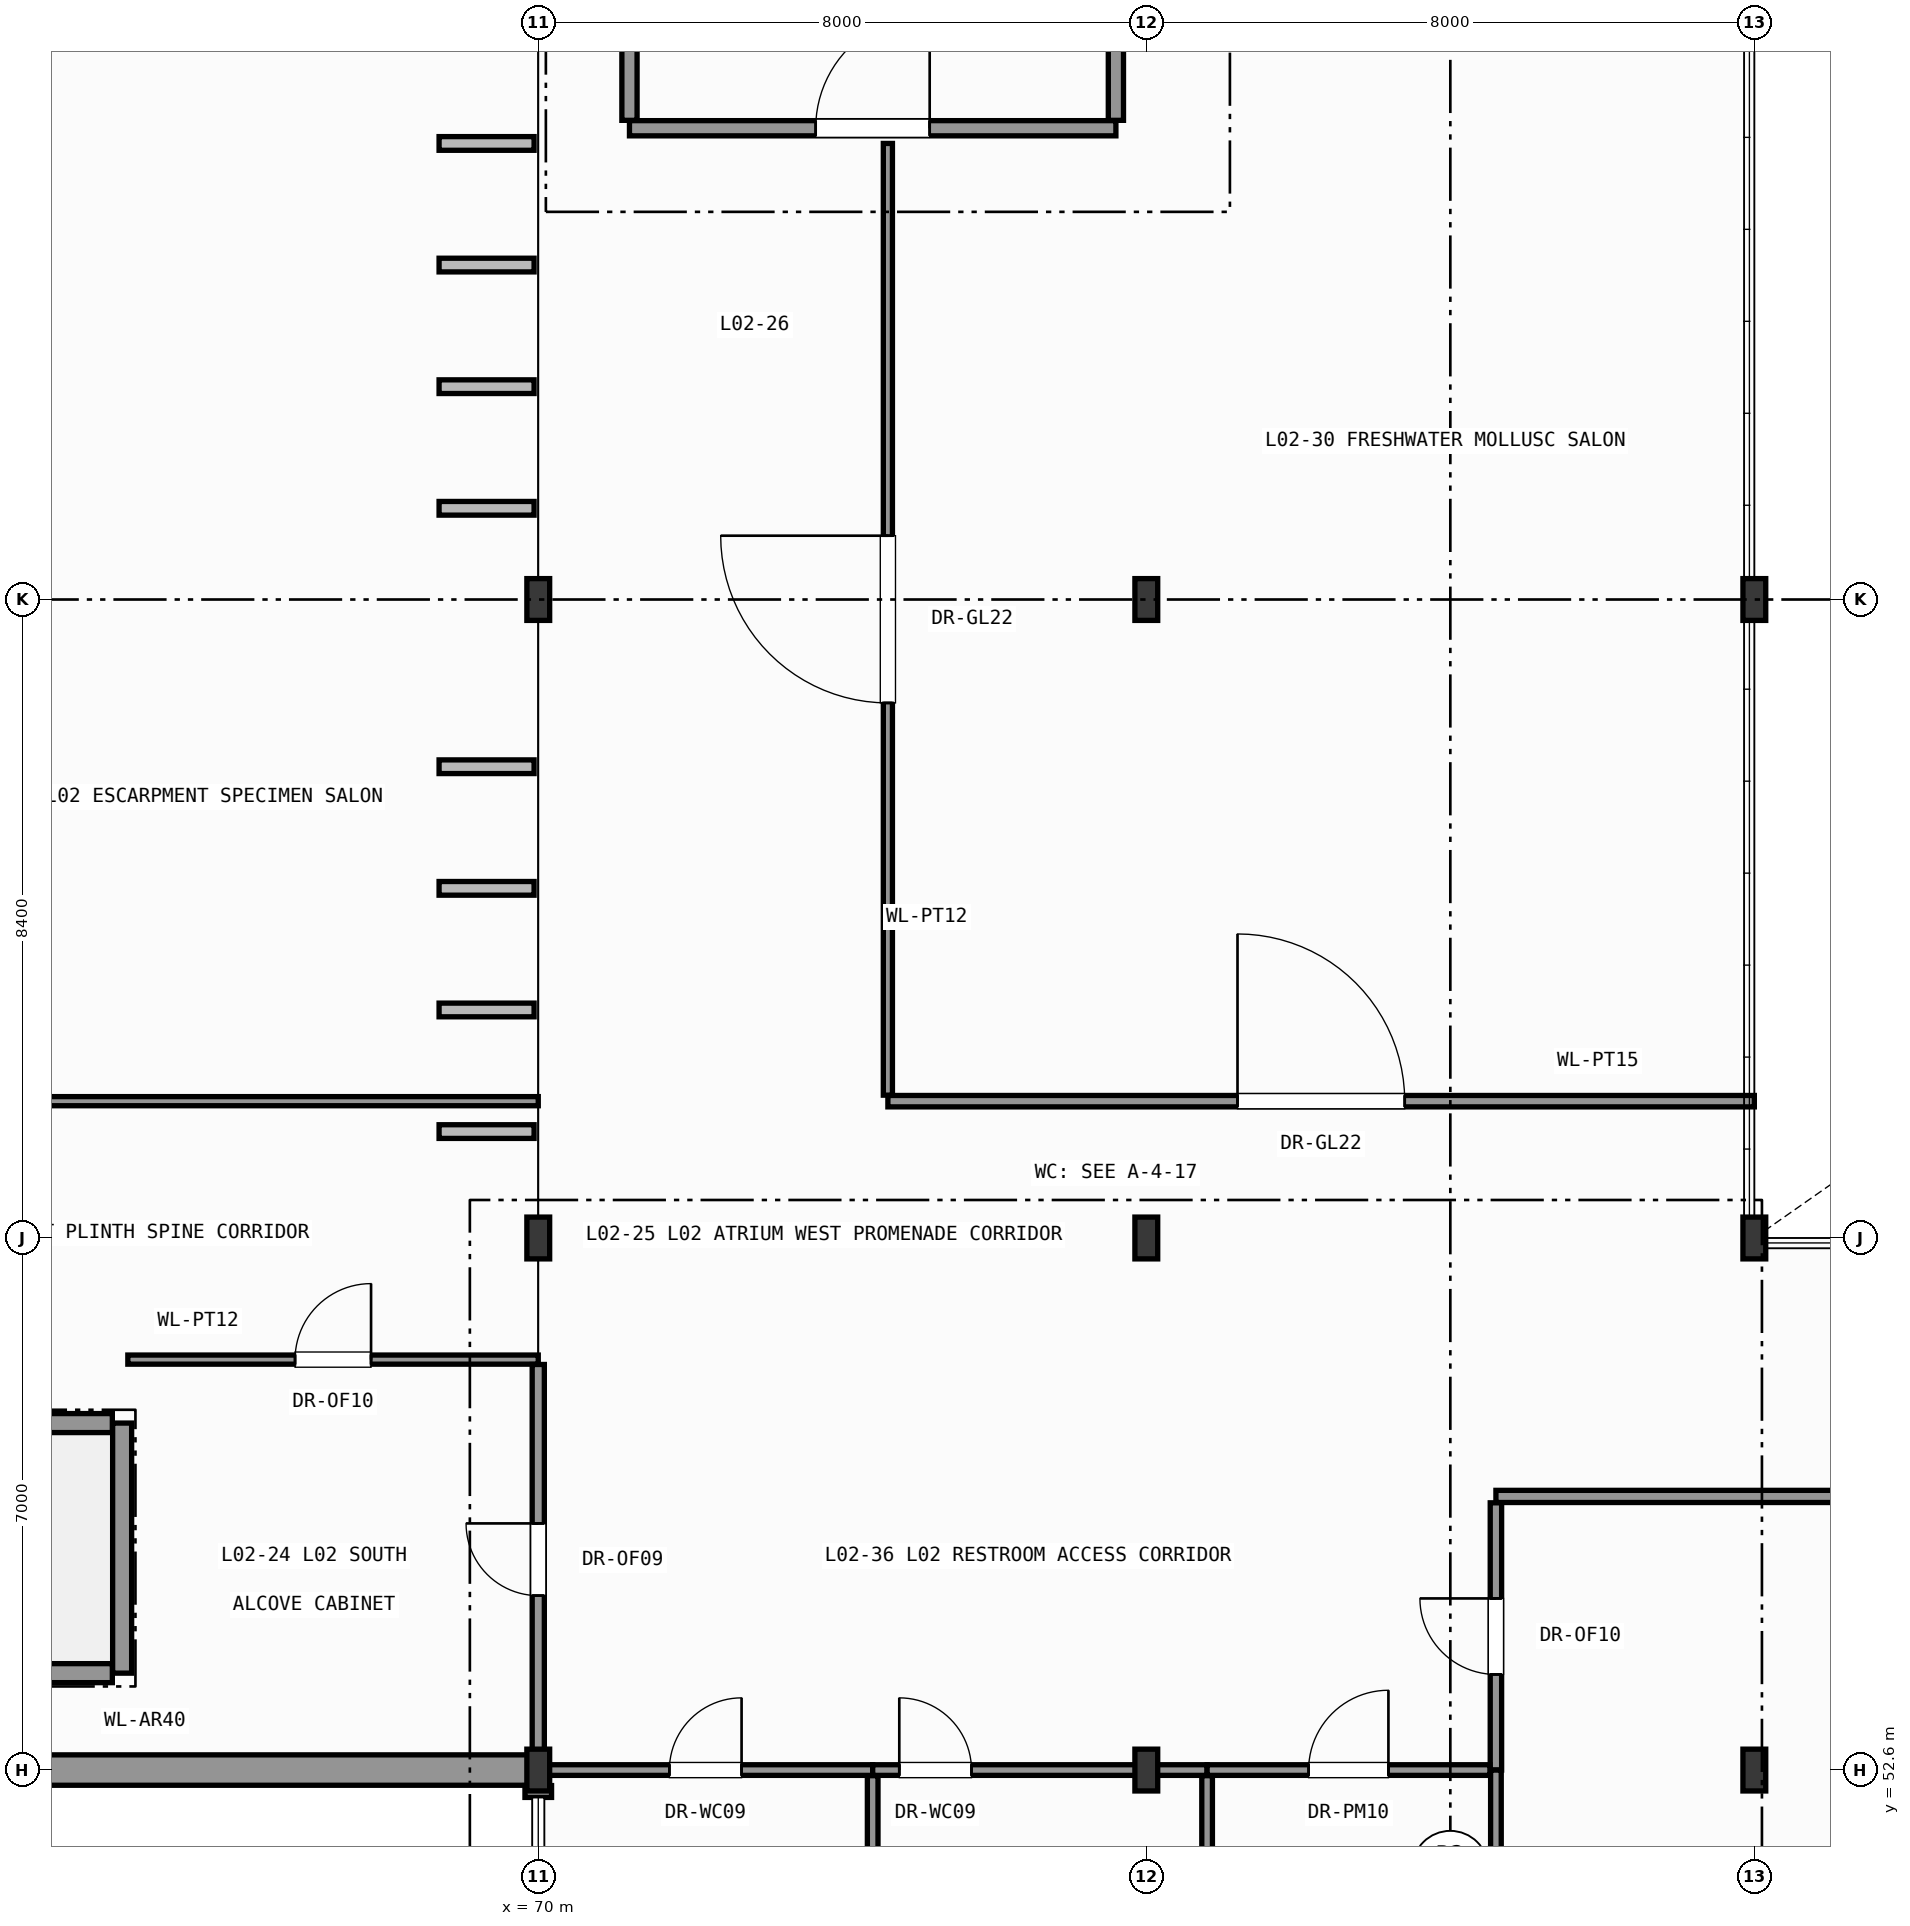
"""IFC4 building model, lengths in metres.
Left out: names, types, materials, properties, quantities, classifications, styles, units other than length and angle.
Written with IfcOpenShell. Run it as: python <this file> out.ifc"""

import sys

from ifc_helpers import new_model, si_unit, direction, frame, frame_2d, origin, origin_2d, place, context, subcontext, project, spatial, rectangle, i_section, extrude, element, fill, save


model = new_model("IFC4")
c1 = context("Model", 3, precision=1e-05, world=origin(), true_north=direction((0.0, 1.0)))
c2 = subcontext(c1, "Body", "Model", "MODEL_VIEW")
j1 = project(units=[si_unit("LENGTHUNIT", "METRE"), si_unit("PLANEANGLEUNIT", "RADIAN")], contexts=[c1])
p1 = place(None, origin())
s1 = spatial("IfcSite", under=j1, at=p1, CompositionType="ELEMENT")
p2 = place(p1, origin())
s2 = spatial("IfcBuilding", under=s1, at=p2, CompositionType="ELEMENT")
p3 = place(p2, frame((0.0, 0.0, 7.8)))
s3 = spatial("IfcBuildingStorey", under=s2, at=p3, CompositionType="ELEMENT", Elevation=7.8)
for number, where, z_axis, x_axis in (
    (1, (70.0, 52.6, 0.0), (0.0, 0.0, 1.0), (1.0, 0.0, 0.0)),
    (2, (70.0, 59.6, 0.0), (0.0, 0.0, 1.0), (1.0, 0.0, 0.0)),
    (3, (70.0, 68.0, 0.0), (0.0, 0.0, 1.0), (1.0, 0.0, 0.0)),
    (4, (78.0, 52.6, 0.0), (0.0, 0.0, 1.0), (1.0, 0.0, 0.0)),
    (5, (78.0, 59.6, 0.0), (0.0, 0.0, 1.0), (1.0, 0.0, 0.0)),
    (6, (78.0, 68.0, 0.0), (0.0, 0.0, 1.0), (1.0, 0.0, 0.0)),
    (7, (86.0, 52.6, 0.0), (0.0, 0.0, 1.0), (1.0, 0.0, 0.0)),
    (8, (86.0, 59.6, 0.0), (0.0, 0.0, 1.0), (1.0, 0.0, 0.0)),
    (9, (86.0, 68.0, 0.0), (0.0, 0.0, 1.0), (1.0, 0.0, 0.0)),
):
    element("IfcColumn", number, at=place(p3, frame(where, z_axis=z_axis, x_axis=x_axis)), inside=s3, PredefinedType="COLUMN", context=c2, shape_type="SweptSolid", body=[
        extrude(i_section(OverallWidth=0.3, OverallDepth=0.55, WebThickness=0.015, FlangeThickness=0.029, FilletRadius=0.027, at=origin_2d()), origin(), (0.0, 0.0, 1.0), 5.4),
    ])
p4 = place(p3, frame((70.0, 52.6, 0.0), z_axis=(0.0, 0.0, 1.0), x_axis=(-1.0, 0.0, 0.0)))
e10 = element("IfcWall", 10, at=p4, inside=s3, PredefinedType="SOLIDWALL", context=c2, shape_type="SweptSolid", body=[
    extrude(rectangle(XDim=14.0, YDim=0.4, at=frame_2d((7.0, 0.0))), origin(), (0.0, 0.0, 1.0), 5.15),
])
p5 = place(p3, frame((70.0, 52.396, 0.0), z_axis=(0.0, 0.0, 1.0), x_axis=(0.0, -1.0, 0.0)))
e11 = element("IfcWall", 11, at=p5, inside=s3, PredefinedType="SOLIDWALL", context=c2, shape_type="SweptSolid", body=[
    extrude(rectangle(XDim=0.156, YDim=0.35, at=frame_2d((0.078, 0.0))), origin(), (0.0, 0.0, 1.0), 5.15),
])
p6 = place(p3, frame((64.525, 53.875, 0.0), z_axis=(0.0, 0.0, 1.0), x_axis=(0.0, 1.0, 0.0)))
e12 = element("IfcWall", 12, at=p6, inside=s3, PredefinedType="SHEAR", context=c2, shape_type="SweptSolid", body=[
    extrude(rectangle(XDim=3.29, YDim=0.25, at=frame_2d((1.645, 0.0))), origin(), (0.0, 0.0, 1.0), 5.15),
])
for number, where, z_axis, x_axis in (
    (13, (57.204, 53.875, 0.0), (0.0, 0.0, 1.0), (1.0, 0.0, 0.0)),
    (14, (57.204, 57.165, 0.0), (0.0, 0.0, 1.0), (1.0, 0.0, 0.0)),
):
    element("IfcWall", number, at=place(p3, frame(where, z_axis=z_axis, x_axis=x_axis)), inside=s3, PredefinedType="SHEAR", context=c2, shape_type="SweptSolid", body=[
        extrude(rectangle(XDim=7.192, YDim=0.25, at=frame_2d((3.596, 0.0))), origin(), (0.0, 0.0, 1.0), 5.15),
    ])
p7 = place(p3, frame((71.2, 74.2, 0.0), z_axis=(0.0, 0.0, 1.0), x_axis=(1.0, 0.0, 0.0)))
e15 = element("IfcWall", 15, at=p7, inside=s3, PredefinedType="PARTITIONING", context=c2, shape_type="SweptSolid", body=[
    extrude(rectangle(XDim=6.4, YDim=0.2, at=frame_2d((3.2, 0.0))), origin(), (0.0, 0.0, 1.0), 5.15),
])
p8 = place(p7, frame((2.45, 0.0, 0.0)))
e16 = element("IfcOpeningElement", 16, at=p8, cuts=e15, PredefinedType="OPENING", context=c2, shape_type="SweptSolid", body=[
    extrude(rectangle(XDim=1.5, YDim=2.2, at=frame_2d((0.75, 1.1))), frame((0.0, 0.11, 0.0), z_axis=(0.0, -1.0, 0.0), x_axis=(1.0, 0.0, 0.0)), (0.0, 0.0, 1.0), 0.22),
])
p9 = place(p3, frame((71.2, 74.304, 0.0), z_axis=(0.0, 0.0, 1.0), x_axis=(0.0, 1.0, 0.0)))
e17 = element("IfcWall", 17, at=p9, inside=s3, PredefinedType="PARTITIONING", context=c2, shape_type="SweptSolid", body=[
    extrude(rectangle(XDim=3.896, YDim=0.2, at=frame_2d((1.948, 0.0))), origin(), (0.0, 0.0, 1.0), 5.15),
])
p10 = place(p3, frame((77.6, 74.304, 0.0), z_axis=(0.0, 0.0, 1.0), x_axis=(0.0, 1.0, 0.0)))
e18 = element("IfcWall", 18, at=p10, inside=s3, PredefinedType="PARTITIONING", context=c2, shape_type="SweptSolid", body=[
    extrude(rectangle(XDim=3.652, YDim=0.2, at=frame_2d((1.826, 0.0))), origin(), (0.0, 0.0, 1.0), 5.15),
])
p11 = place(p3, frame((43.6, 61.4, 0.0), z_axis=(0.0, 0.0, 1.0), x_axis=(1.0, 0.0, 0.0)))
e19 = element("IfcWall", 19, at=p11, inside=s3, PredefinedType="PARTITIONING", context=c2, shape_type="SweptSolid", body=[
    extrude(rectangle(XDim=26.4, YDim=0.12, at=frame_2d((13.2, 0.0))), origin(), (0.0, 0.0, 1.0), 5.15),
])
p12 = place(p11, frame((12.1, 0.0, 0.0)))
e20 = element("IfcOpeningElement", 20, at=p12, cuts=e19, PredefinedType="OPENING", context=c2, shape_type="SweptSolid", body=[
    extrude(rectangle(XDim=2.2, YDim=2.6, at=frame_2d((1.1, 1.3))), frame((0.0, 0.07, 0.0), z_axis=(0.0, -1.0, 0.0), x_axis=(1.0, 0.0, 0.0)), (0.0, 0.0, 1.0), 0.14),
])
p13 = place(p3, frame((64.6, 58.0, 0.0), z_axis=(0.0, 0.0, 1.0), x_axis=(1.0, 0.0, 0.0)))
e21 = element("IfcWall", 21, at=p13, inside=s3, PredefinedType="PARTITIONING", context=c2, shape_type="SweptSolid", body=[
    extrude(rectangle(XDim=5.4, YDim=0.12, at=frame_2d((2.7, 0.0))), origin(), (0.0, 0.0, 1.0), 5.15),
])
p14 = place(p13, frame((2.2, 0.0, 0.0)))
e22 = element("IfcOpeningElement", 22, at=p14, cuts=e21, PredefinedType="OPENING", context=c2, shape_type="SweptSolid", body=[
    extrude(rectangle(XDim=1.0, YDim=2.15, at=frame_2d((0.5, 1.075))), frame((0.0, 0.07, 0.0), z_axis=(0.0, -1.0, 0.0), x_axis=(1.0, 0.0, 0.0)), (0.0, 0.0, 1.0), 0.14),
])
p15 = place(p3, frame((70.0, 52.804, 0.0), z_axis=(0.0, 0.0, 1.0), x_axis=(0.0, 1.0, 0.0)))
e23 = element("IfcWall", 23, at=p15, inside=s3, PredefinedType="PARTITIONING", context=c2, shape_type="SweptSolid", body=[
    extrude(rectangle(XDim=5.132, YDim=0.16, at=frame_2d((2.566, 0.0))), origin(), (0.0, 0.0, 1.0), 4.845),
])
p16 = place(p15, frame((2.091, 0.0, 0.0)))
e24 = element("IfcOpeningElement", 24, at=p16, cuts=e23, PredefinedType="OPENING", context=c2, shape_type="SweptSolid", body=[
    extrude(rectangle(XDim=0.95, YDim=2.1, at=frame_2d((0.475, 1.05))), frame((0.0, 0.09, 0.0), z_axis=(0.0, -1.0, 0.0), x_axis=(1.0, 0.0, 0.0)), (0.0, 0.0, 1.0), 0.18),
])
p17 = place(p3, frame((74.6, 61.4, 0.0), z_axis=(0.0, 0.0, 1.0), x_axis=(1.0, 0.0, 0.0)))
e25 = element("IfcWall", 25, at=p17, inside=s3, PredefinedType="PARTITIONING", context=c2, shape_type="SweptSolid", body=[
    extrude(rectangle(XDim=11.4, YDim=0.15, at=frame_2d((5.7, 0.0))), origin(), (0.0, 0.0, 1.0), 5.15),
])
p18 = place(p17, frame((4.6, 0.0, 0.0)))
e26 = element("IfcOpeningElement", 26, at=p18, cuts=e25, PredefinedType="OPENING", context=c2, shape_type="SweptSolid", body=[
    extrude(rectangle(XDim=2.2, YDim=2.6, at=frame_2d((1.1, 1.3))), frame((0.0, 0.085, 0.0), z_axis=(0.0, -1.0, 0.0), x_axis=(1.0, 0.0, 0.0)), (0.0, 0.0, 1.0), 0.17),
])
p19 = place(p3, frame((74.6, 61.479, 0.0), z_axis=(0.0, 0.0, 1.0), x_axis=(0.0, 1.0, 0.0)))
e27 = element("IfcWall", 27, at=p19, inside=s3, PredefinedType="PARTITIONING", context=c2, shape_type="SweptSolid", body=[
    extrude(rectangle(XDim=12.521, YDim=0.12, at=frame_2d((6.26, 0.0))), origin(), (0.0, 0.0, 1.0), 5.15),
])
p20 = place(p19, frame((5.16, 0.0, 0.0)))
e28 = element("IfcOpeningElement", 28, at=p20, cuts=e27, PredefinedType="OPENING", context=c2, shape_type="SweptSolid", body=[
    extrude(rectangle(XDim=2.2, YDim=2.6, at=frame_2d((1.1, 1.3))), frame((0.0, 0.07, 0.0), z_axis=(0.0, -1.0, 0.0), x_axis=(1.0, 0.0, 0.0)), (0.0, 0.0, 1.0), 0.14),
])
p21 = place(p3, frame((82.6, 56.2, 0.0), z_axis=(0.0, 0.0, 1.0), x_axis=(1.0, 0.0, 0.0)))
e29 = element("IfcWall", 29, at=p21, inside=s3, PredefinedType="PARTITIONING", context=c2, shape_type="SweptSolid", body=[
    extrude(rectangle(XDim=35.646, YDim=0.16, at=frame_2d((17.823, 0.0))), origin(), (0.0, 0.0, 1.0), 4.775),
])
p22 = place(p21, frame((16.723, 0.0, 0.0)))
e30 = element("IfcOpeningElement", 30, at=p22, cuts=e29, PredefinedType="OPENING", context=c2, shape_type="SweptSolid", body=[
    extrude(rectangle(XDim=2.2, YDim=2.6, at=frame_2d((1.1, 1.3))), frame((0.0, 0.09, 0.0), z_axis=(0.0, -1.0, 0.0), x_axis=(1.0, 0.0, 0.0)), (0.0, 0.0, 1.0), 0.18),
])
p23 = place(p3, frame((82.6, 52.6, 0.0), z_axis=(0.0, 0.0, 1.0), x_axis=(0.0, 1.0, 0.0)))
e31 = element("IfcWall", 31, at=p23, inside=s3, PredefinedType="PARTITIONING", context=c2, shape_type="SweptSolid", body=[
    extrude(rectangle(XDim=3.516, YDim=0.15, at=frame_2d((1.758, 0.0))), origin(), (0.0, 0.0, 1.0), 5.15),
])
p24 = place(p23, frame((1.258, 0.0, 0.0)))
e32 = element("IfcOpeningElement", 32, at=p24, cuts=e31, PredefinedType="OPENING", context=c2, shape_type="SweptSolid", body=[
    extrude(rectangle(XDim=1.0, YDim=2.15, at=frame_2d((0.5, 1.075))), frame((0.0, 0.085, 0.0), z_axis=(0.0, -1.0, 0.0), x_axis=(1.0, 0.0, 0.0)), (0.0, 0.0, 1.0), 0.17),
])
p25 = place(p3, frame((82.6, 45.6, 0.0), z_axis=(0.0, 0.0, 1.0), x_axis=(0.0, 1.0, 0.0)))
e33 = element("IfcWall", 33, at=p25, inside=s3, PredefinedType="PARTITIONING", context=c2, shape_type="SweptSolid", body=[
    extrude(rectangle(XDim=7.0, YDim=0.14, at=frame_2d((3.5, 0.0))), origin(), (0.0, 0.0, 1.0), 5.15),
])
p26 = place(p25, frame((2.975, 0.0, 0.0)))
e34 = element("IfcOpeningElement", 34, at=p26, cuts=e33, PredefinedType="OPENING", context=c2, shape_type="SweptSolid", body=[
    extrude(rectangle(XDim=1.05, YDim=2.15, at=frame_2d((0.525, 1.075))), frame((0.0, 0.08, 0.0), z_axis=(0.0, -1.0, 0.0), x_axis=(1.0, 0.0, 0.0)), (0.0, 0.0, 1.0), 0.16),
])
p27 = place(p3, frame((70.0, 52.6, 0.0), z_axis=(0.0, 0.0, 1.0), x_axis=(1.0, 0.0, 0.0)))
e35 = element("IfcWall", 35, at=p27, inside=s3, PredefinedType="PARTITIONING", context=c2, shape_type="SweptSolid", body=[
    extrude(rectangle(XDim=4.4, YDim=0.14, at=frame_2d((2.2, 0.0))), origin(), (0.0, 0.0, 1.0), 4.735),
])
p28 = place(p27, frame((1.725, 0.0, 0.0)))
e36 = element("IfcOpeningElement", 36, at=p28, cuts=e35, PredefinedType="OPENING", context=c2, shape_type="SweptSolid", body=[
    extrude(rectangle(XDim=0.95, YDim=2.1, at=frame_2d((0.475, 1.05))), frame((0.0, 0.08, 0.0), z_axis=(0.0, -1.0, 0.0), x_axis=(1.0, 0.0, 0.0)), (0.0, 0.0, 1.0), 0.16),
])
p29 = place(p3, frame((74.4, 52.6, 0.0), z_axis=(0.0, 0.0, 1.0), x_axis=(1.0, 0.0, 0.0)))
e37 = element("IfcWall", 37, at=p29, inside=s3, PredefinedType="PARTITIONING", context=c2, shape_type="SweptSolid", body=[
    extrude(rectangle(XDim=4.4, YDim=0.14, at=frame_2d((2.2, 0.0))), origin(), (0.0, 0.0, 1.0), 4.735),
])
p30 = place(p29, frame((0.35, 0.0, 0.0)))
e38 = element("IfcOpeningElement", 38, at=p30, cuts=e37, PredefinedType="OPENING", context=c2, shape_type="SweptSolid", body=[
    extrude(rectangle(XDim=0.95, YDim=2.1, at=frame_2d((0.475, 1.05))), frame((0.0, 0.08, 0.0), z_axis=(0.0, -1.0, 0.0), x_axis=(1.0, 0.0, 0.0)), (0.0, 0.0, 1.0), 0.16),
])
p31 = place(p3, frame((78.8, 52.6, 0.0), z_axis=(0.0, 0.0, 1.0), x_axis=(1.0, 0.0, 0.0)))
e39 = element("IfcWall", 39, at=p31, inside=s3, PredefinedType="PARTITIONING", context=c2, shape_type="SweptSolid", body=[
    extrude(rectangle(XDim=3.721, YDim=0.14, at=frame_2d((1.86, 0.0))), origin(), (0.0, 0.0, 1.0), 4.735),
])
p32 = place(p31, frame((1.335, 0.0, 0.0)))
e40 = element("IfcOpeningElement", 40, at=p32, cuts=e39, PredefinedType="OPENING", context=c2, shape_type="SweptSolid", body=[
    extrude(rectangle(XDim=1.05, YDim=2.15, at=frame_2d((0.525, 1.075))), frame((0.0, 0.08, 0.0), z_axis=(0.0, -1.0, 0.0), x_axis=(1.0, 0.0, 0.0)), (0.0, 0.0, 1.0), 0.16),
])
for number, where, z_axis, x_axis in (
    (41, (74.4, 45.6, 0.0), (0.0, 0.0, 1.0), (0.0, 1.0, 0.0)),
    (42, (78.8, 45.6, 0.0), (0.0, 0.0, 1.0), (0.0, 1.0, 0.0)),
):
    element("IfcWall", number, at=place(p3, frame(where, z_axis=z_axis, x_axis=x_axis)), inside=s3, PredefinedType="PARTITIONING", context=c2, shape_type="SweptSolid", body=[
        extrude(rectangle(XDim=6.926, YDim=0.14, at=frame_2d((3.463, 0.0))), origin(), (0.0, 0.0, 1.0), 5.15),
    ])
p33 = place(p8, origin())
e43 = element("IfcDoor", 43, at=p33, inside=s3, OperationType="SINGLE_SWING_RIGHT", PredefinedType="DOOR", context=c2, shape_type="SweptSolid", body=[
    extrude(rectangle(XDim=1.5, YDim=2.2, at=frame_2d((0.75, 1.1))), frame((0.0, 0.025, 0.0), z_axis=(0.0, -1.0, 0.0), x_axis=(1.0, 0.0, 0.0)), (0.0, 0.0, 1.0), 0.05),
])
fill(e16, e43)
p34 = place(p14, origin())
e44 = element("IfcDoor", 44, at=p34, inside=s3, OperationType="SINGLE_SWING_RIGHT", PredefinedType="DOOR", context=c2, shape_type="SweptSolid", body=[
    extrude(rectangle(XDim=1.0, YDim=2.15, at=frame_2d((0.5, 1.075))), frame((0.0, 0.025, 0.0), z_axis=(0.0, -1.0, 0.0), x_axis=(1.0, 0.0, 0.0)), (0.0, 0.0, 1.0), 0.05),
])
fill(e22, e44)
p35 = place(p16, origin())
e45 = element("IfcDoor", 45, at=p35, inside=s3, OperationType="SINGLE_SWING_RIGHT", PredefinedType="DOOR", context=c2, shape_type="SweptSolid", body=[
    extrude(rectangle(XDim=0.95, YDim=2.1, at=frame_2d((0.475, 1.05))), frame((0.0, 0.025, 0.0), z_axis=(0.0, -1.0, 0.0), x_axis=(1.0, 0.0, 0.0)), (0.0, 0.0, 1.0), 0.05),
])
fill(e24, e45)
p36 = place(p18, origin())
e46 = element("IfcDoor", 46, at=p36, inside=s3, OperationType="SINGLE_SWING_LEFT", PredefinedType="DOOR", context=c2, shape_type="SweptSolid", body=[
    extrude(rectangle(XDim=2.2, YDim=2.6, at=frame_2d((1.1, 1.3))), frame((0.0, 0.025, 0.0), z_axis=(0.0, -1.0, 0.0), x_axis=(1.0, 0.0, 0.0)), (0.0, 0.0, 1.0), 0.05),
])
fill(e26, e46)
p37 = place(p20, origin())
e47 = element("IfcDoor", 47, at=p37, inside=s3, OperationType="SINGLE_SWING_RIGHT", PredefinedType="DOOR", context=c2, shape_type="SweptSolid", body=[
    extrude(rectangle(XDim=2.2, YDim=2.6, at=frame_2d((1.1, 1.3))), frame((0.0, 0.025, 0.0), z_axis=(0.0, -1.0, 0.0), x_axis=(1.0, 0.0, 0.0)), (0.0, 0.0, 1.0), 0.05),
])
fill(e28, e47)
p38 = place(p24, origin())
e48 = element("IfcDoor", 48, at=p38, inside=s3, OperationType="SINGLE_SWING_RIGHT", PredefinedType="DOOR", context=c2, shape_type="SweptSolid", body=[
    extrude(rectangle(XDim=1.0, YDim=2.15, at=frame_2d((0.5, 1.075))), frame((0.0, 0.025, 0.0), z_axis=(0.0, -1.0, 0.0), x_axis=(1.0, 0.0, 0.0)), (0.0, 0.0, 1.0), 0.05),
])
fill(e32, e48)
p39 = place(p28, origin())
e49 = element("IfcDoor", 49, at=p39, inside=s3, OperationType="SINGLE_SWING_RIGHT", PredefinedType="DOOR", context=c2, shape_type="SweptSolid", body=[
    extrude(rectangle(XDim=0.95, YDim=2.1, at=frame_2d((0.475, 1.05))), frame((0.0, 0.025, 0.0), z_axis=(0.0, -1.0, 0.0), x_axis=(1.0, 0.0, 0.0)), (0.0, 0.0, 1.0), 0.05),
])
fill(e36, e49)
p40 = place(p30, origin())
e50 = element("IfcDoor", 50, at=p40, inside=s3, OperationType="SINGLE_SWING_LEFT", PredefinedType="DOOR", context=c2, shape_type="SweptSolid", body=[
    extrude(rectangle(XDim=0.95, YDim=2.1, at=frame_2d((0.475, 1.05))), frame((0.0, 0.025, 0.0), z_axis=(0.0, -1.0, 0.0), x_axis=(1.0, 0.0, 0.0)), (0.0, 0.0, 1.0), 0.05),
])
fill(e38, e50)
p41 = place(p32, origin())
e51 = element("IfcDoor", 51, at=p41, inside=s3, OperationType="SINGLE_SWING_RIGHT", PredefinedType="DOOR", context=c2, shape_type="SweptSolid", body=[
    extrude(rectangle(XDim=1.05, YDim=2.15, at=frame_2d((0.525, 1.075))), frame((0.0, 0.025, 0.0), z_axis=(0.0, -1.0, 0.0), x_axis=(1.0, 0.0, 0.0)), (0.0, 0.0, 1.0), 0.05),
])
fill(e40, e51)
save(model, sys.argv[1])
